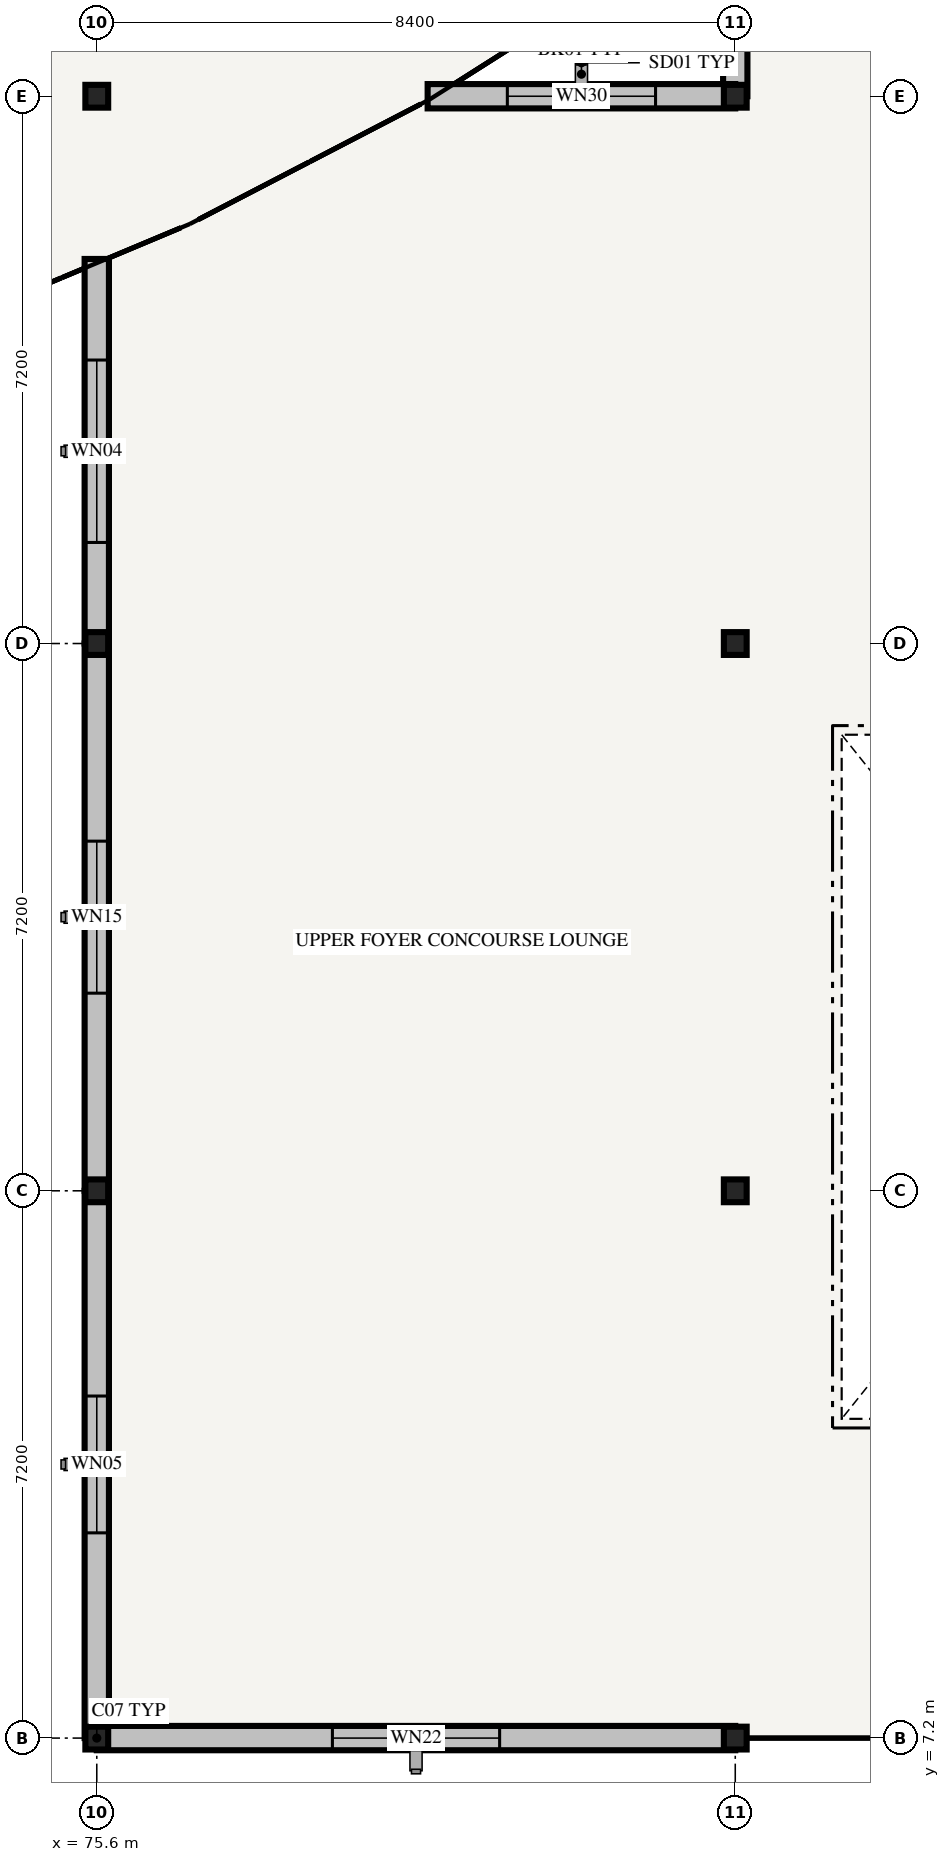
"""IFC4 building model, lengths in metres.
Left out: names, types, materials, properties, quantities, classifications, styles, units other than length and angle.
Written with IfcOpenShell. Run it as: python <this file> out.ifc"""

import sys

from ifc_helpers import new_model, si_unit, direction, frame, frame_2d, origin, origin_2d, place, context, subcontext, project, spatial, rectangle, i_section, extrude, element, fill, save


model = new_model("IFC4")
c1 = context("Model", 3, precision=1e-05, world=origin(), true_north=direction((0.0, 1.0)))
c2 = subcontext(c1, "Body", "Model", "MODEL_VIEW")
j1 = project(units=[si_unit("LENGTHUNIT", "METRE"), si_unit("PLANEANGLEUNIT", "RADIAN")], contexts=[c1])
p1 = place(None, origin())
s1 = spatial("IfcSite", under=j1, at=p1, CompositionType="ELEMENT")
p2 = place(p1, origin())
s2 = spatial("IfcBuilding", under=s1, at=p2, CompositionType="ELEMENT")
p3 = place(p2, frame((0.0, 0.0, 4.5)))
s3 = spatial("IfcBuildingStorey", under=s2, at=p3, CompositionType="ELEMENT", Elevation=4.5)
for number, where, z_axis, x_axis in (
    (1, (75.6, 7.2, 0.0), (0.0, 0.0, 1.0), (1.0, 0.0, 0.0)),
    (2, (75.6, 14.4, 0.0), (0.0, 0.0, 1.0), (1.0, 0.0, 0.0)),
    (3, (75.6, 21.6, 0.0), (0.0, 0.0, 1.0), (1.0, 0.0, 0.0)),
    (4, (75.6, 28.8, 0.0), (0.0, 0.0, 1.0), (1.0, 0.0, 0.0)),
    (5, (84.0, 7.2, 0.0), (0.0, 0.0, 1.0), (1.0, 0.0, 0.0)),
    (6, (84.0, 14.4, 0.0), (0.0, 0.0, 1.0), (1.0, 0.0, 0.0)),
    (7, (84.0, 21.6, 0.0), (0.0, 0.0, 1.0), (1.0, 0.0, 0.0)),
    (8, (84.0, 28.8, 0.0), (0.0, 0.0, 1.0), (1.0, 0.0, 0.0)),
):
    element("IfcColumn", number, at=place(p3, frame(where, z_axis=z_axis, x_axis=x_axis)), inside=s3, PredefinedType="COLUMN", context=c2, shape_type="SweptSolid", body=[
        extrude(i_section(OverallWidth=0.3, OverallDepth=0.3, WebThickness=0.011, FlangeThickness=0.019, FilletRadius=0.027, at=origin_2d()), origin(), (0.0, 0.0, 1.0), 4.2),
    ])
p4 = place(p3, frame((84.0, 31.525, 0.0), z_axis=(0.0, 0.0, 1.0), x_axis=(0.0, -1.0, 0.0)))
e9 = element("IfcWall", 9, at=p4, inside=s3, PredefinedType="STANDARD", context=c2, shape_type="SweptSolid", body=[
    extrude(rectangle(XDim=2.725, YDim=0.32, at=frame_2d((1.362, 0.0))), origin(), (0.0, 0.0, 1.0), 3.385),
])
p5 = place(p3, frame((84.0, 28.8, 0.0), z_axis=(0.0, 0.0, 1.0), x_axis=(-1.0, 0.0, 0.0)))
e10 = element("IfcWall", 10, at=p5, inside=s3, PredefinedType="STANDARD", context=c2, shape_type="SweptSolid", body=[
    extrude(rectangle(XDim=4.047, YDim=0.32, at=frame_2d((2.023, 0.0))), origin(), (0.0, 0.0, 1.0), 3.385),
])
p6 = place(p5, frame((1.049, 0.0, 0.85)))
e11 = element("IfcOpeningElement", 11, at=p6, cuts=e10, PredefinedType="OPENING", context=c2, shape_type="SweptSolid", body=[
    extrude(rectangle(XDim=1.95, YDim=1.95, at=frame_2d((0.975, 0.975))), frame((0.0, 0.185, 0.0), z_axis=(0.0, -1.0, 0.0), x_axis=(1.0, 0.0, 0.0)), (0.0, 0.0, 1.0), 0.37),
])
p7 = place(p3, frame((75.6, 26.659, 0.0), z_axis=(0.0, 0.0, 1.0), x_axis=(0.0, -1.0, 0.0)))
e12 = element("IfcWall", 12, at=p7, inside=s3, PredefinedType="STANDARD", context=c2, shape_type="SweptSolid", body=[
    extrude(rectangle(XDim=5.059, YDim=0.32, at=frame_2d((2.53, 0.0))), origin(), (0.0, 0.0, 1.0), 3.485),
])
p8 = place(p7, frame((1.33, 0.0, 0.85)))
e13 = element("IfcOpeningElement", 13, at=p8, cuts=e12, PredefinedType="OPENING", context=c2, shape_type="SweptSolid", body=[
    extrude(rectangle(XDim=2.4, YDim=1.8, at=frame_2d((1.2, 0.9))), frame((0.0, 0.185, 0.0), z_axis=(0.0, -1.0, 0.0), x_axis=(1.0, 0.0, 0.0)), (0.0, 0.0, 1.0), 0.37),
])
p9 = place(p3, frame((75.6, 21.6, 0.0), z_axis=(0.0, 0.0, 1.0), x_axis=(0.0, -1.0, 0.0)))
e14 = element("IfcWall", 14, at=p9, inside=s3, PredefinedType="STANDARD", context=c2, shape_type="SweptSolid", body=[
    extrude(rectangle(XDim=7.2, YDim=0.32, at=frame_2d((3.6, 0.0))), origin(), (0.0, 0.0, 1.0), 3.485),
])
p10 = place(p9, frame((2.6, 0.0, 0.85)))
e15 = element("IfcOpeningElement", 15, at=p10, cuts=e14, PredefinedType="OPENING", context=c2, shape_type="SweptSolid", body=[
    extrude(rectangle(XDim=2.0, YDim=1.6, at=frame_2d((1.0, 0.8))), frame((0.0, 0.185, 0.0), z_axis=(0.0, -1.0, 0.0), x_axis=(1.0, 0.0, 0.0)), (0.0, 0.0, 1.0), 0.37),
])
p11 = place(p3, frame((75.6, 14.4, 0.0), z_axis=(0.0, 0.0, 1.0), x_axis=(0.0, -1.0, 0.0)))
e16 = element("IfcWall", 16, at=p11, inside=s3, PredefinedType="STANDARD", context=c2, shape_type="SweptSolid", body=[
    extrude(rectangle(XDim=7.2, YDim=0.32, at=frame_2d((3.6, 0.0))), origin(), (0.0, 0.0, 1.0), 3.485),
])
p12 = place(p11, frame((2.7, 0.0, 0.85)))
e17 = element("IfcOpeningElement", 17, at=p12, cuts=e16, PredefinedType="OPENING", context=c2, shape_type="SweptSolid", body=[
    extrude(rectangle(XDim=1.8, YDim=1.8, at=frame_2d((0.9, 0.9))), frame((0.0, 0.185, 0.0), z_axis=(0.0, -1.0, 0.0), x_axis=(1.0, 0.0, 0.0)), (0.0, 0.0, 1.0), 0.37),
])
p13 = place(p3, frame((75.6, 7.2, 0.0), z_axis=(0.0, 0.0, 1.0), x_axis=(1.0, 0.0, 0.0)))
e18 = element("IfcWall", 18, at=p13, inside=s3, PredefinedType="STANDARD", context=c2, shape_type="SweptSolid", body=[
    extrude(rectangle(XDim=8.4, YDim=0.32, at=frame_2d((4.2, 0.0))), origin(), (0.0, 0.0, 1.0), 3.485),
])
p14 = place(p13, frame((3.1, 0.0, 0.85)))
e19 = element("IfcOpeningElement", 19, at=p14, cuts=e18, PredefinedType="OPENING", context=c2, shape_type="SweptSolid", body=[
    extrude(rectangle(XDim=2.2, YDim=1.55, at=frame_2d((1.1, 0.775))), frame((0.0, 0.185, 0.0), z_axis=(0.0, -1.0, 0.0), x_axis=(1.0, 0.0, 0.0)), (0.0, 0.0, 1.0), 0.37),
])
p15 = place(p6, origin())
e20 = element("IfcWindow", 20, at=p15, inside=s3, PartitioningType="SINGLE_PANEL", PredefinedType="WINDOW", context=c2, shape_type="SweptSolid", body=[
    extrude(rectangle(XDim=1.95, YDim=1.95, at=frame_2d((0.975, 0.975))), frame((0.0, 0.03, 0.0), z_axis=(0.0, -1.0, 0.0), x_axis=(1.0, 0.0, 0.0)), (0.0, 0.0, 1.0), 0.06),
])
fill(e11, e20)
p16 = place(p8, origin())
e21 = element("IfcWindow", 21, at=p16, inside=s3, PartitioningType="SINGLE_PANEL", PredefinedType="WINDOW", context=c2, shape_type="SweptSolid", body=[
    extrude(rectangle(XDim=2.4, YDim=1.8, at=frame_2d((1.2, 0.9))), frame((0.0, 0.03, 0.0), z_axis=(0.0, -1.0, 0.0), x_axis=(1.0, 0.0, 0.0)), (0.0, 0.0, 1.0), 0.06),
])
fill(e13, e21)
p17 = place(p10, origin())
e22 = element("IfcWindow", 22, at=p17, inside=s3, PartitioningType="SINGLE_PANEL", PredefinedType="WINDOW", context=c2, shape_type="SweptSolid", body=[
    extrude(rectangle(XDim=2.0, YDim=1.6, at=frame_2d((1.0, 0.8))), frame((0.0, 0.03, 0.0), z_axis=(0.0, -1.0, 0.0), x_axis=(1.0, 0.0, 0.0)), (0.0, 0.0, 1.0), 0.06),
])
fill(e15, e22)
p18 = place(p12, origin())
e23 = element("IfcWindow", 23, at=p18, inside=s3, PartitioningType="SINGLE_PANEL", PredefinedType="WINDOW", context=c2, shape_type="SweptSolid", body=[
    extrude(rectangle(XDim=1.8, YDim=1.8, at=frame_2d((0.9, 0.9))), frame((0.0, 0.03, 0.0), z_axis=(0.0, -1.0, 0.0), x_axis=(1.0, 0.0, 0.0)), (0.0, 0.0, 1.0), 0.06),
])
fill(e17, e23)
p19 = place(p14, origin())
e24 = element("IfcWindow", 24, at=p19, inside=s3, PartitioningType="SINGLE_PANEL", PredefinedType="WINDOW", context=c2, shape_type="SweptSolid", body=[
    extrude(rectangle(XDim=2.2, YDim=1.55, at=frame_2d((1.1, 0.775))), frame((0.0, 0.03, 0.0), z_axis=(0.0, -1.0, 0.0), x_axis=(1.0, 0.0, 0.0)), (0.0, 0.0, 1.0), 0.06),
])
fill(e19, e24)
save(model, sys.argv[1])
